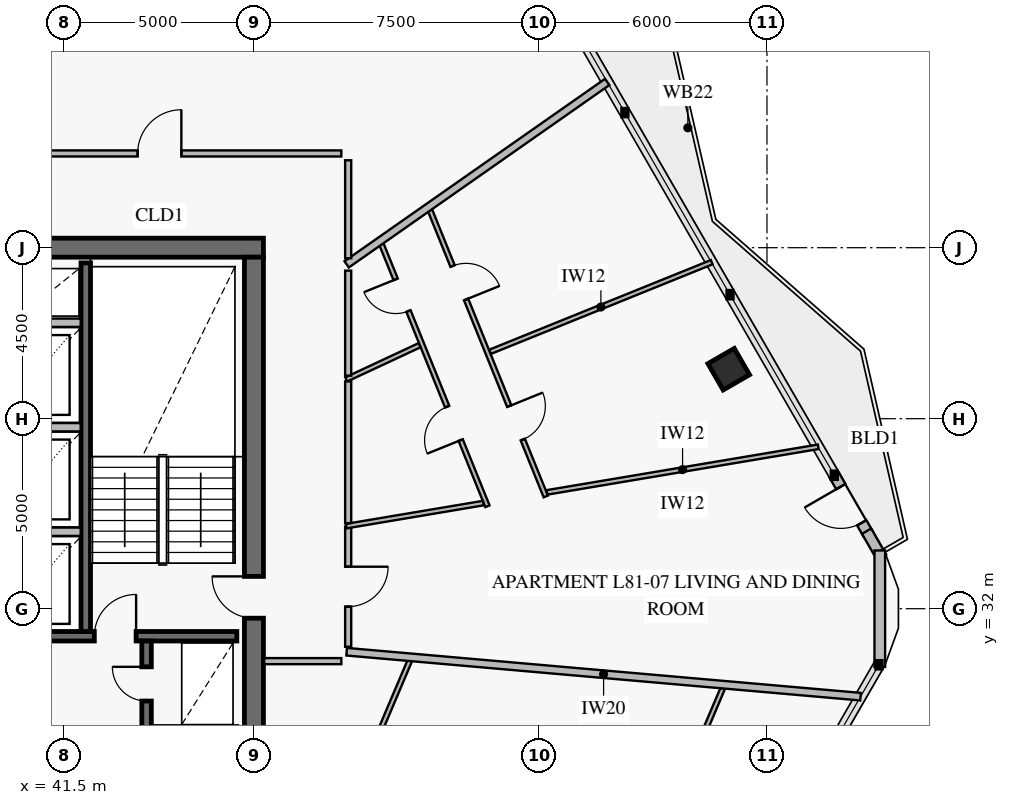
"""IFC4 building model, lengths in metres.
Left out: names, types, materials, properties, quantities, classifications, styles, units other than length and angle.
Written with IfcOpenShell. Run it as: python <this file> out.ifc"""

import sys

from ifc_helpers import new_model, si_unit, direction, frame, frame_2d, origin, origin_2d, place, context, subcontext, project, spatial, rectangle, extrude, element, fill, save


model = new_model("IFC4")
c1 = context("Model", 3, precision=1e-05, world=origin(), true_north=direction((0.0, 1.0)))
c2 = subcontext(c1, "Body", "Model", "MODEL_VIEW")
j1 = project(units=[si_unit("LENGTHUNIT", "METRE"), si_unit("PLANEANGLEUNIT", "RADIAN")], contexts=[c1])
p1 = place(None, origin())
s1 = spatial("IfcSite", under=j1, at=p1, CompositionType="ELEMENT")
p2 = place(p1, origin())
s2 = spatial("IfcBuilding", under=s1, at=p2, CompositionType="ELEMENT")
p3 = place(p2, frame((0.0, 0.0, 319.6)))
s3 = spatial("IfcBuildingStorey", under=s2, at=p3, CompositionType="ELEMENT", Elevation=319.6)
p4 = place(p3, frame((46.75, 41.5, 0.0), z_axis=(0.0, 0.0, 1.0), x_axis=(-1.0, 0.0, 0.0)))
e1 = element("IfcWall", 1, at=p4, inside=s3, PredefinedType="SHEAR", context=c2, shape_type="SweptSolid", body=[
    extrude(rectangle(XDim=7.8, YDim=0.5, at=frame_2d((3.9, 0.0))), origin(), (0.0, 0.0, 1.0), 3.8),
])
p5 = place(p3, frame((46.5, 22.75, 0.0), z_axis=(0.0, 0.0, 1.0), x_axis=(0.0, 1.0, 0.0)))
e2 = element("IfcWall", 2, at=p5, inside=s3, PredefinedType="SHEAR", context=c2, shape_type="SweptSolid", body=[
    extrude(rectangle(XDim=18.5, YDim=0.5, at=frame_2d((9.25, 0.0))), origin(), (0.0, 0.0, 1.0), 3.8),
])
p6 = place(p5, frame((9.0, 0.0, 0.0)))
e3 = element("IfcOpeningElement", 3, at=p6, cuts=e2, PredefinedType="OPENING", context=c2, shape_type="SweptSolid", body=[
    extrude(rectangle(XDim=1.1, YDim=2.15, at=frame_2d((0.55, 1.075))), frame((0.0, 0.262, 0.0), z_axis=(0.0, -1.0, 0.0), x_axis=(1.0, 0.0, 0.0)), (0.0, 0.0, 1.0), 0.524),
])
p7 = place(p3, frame((58.993, 38.302, 0.0), z_axis=(0.0, 0.0, 1.0), x_axis=(-0.5, 0.866025403784, 0.0)))
e4 = element("IfcColumn", 4, at=p7, inside=s3, PredefinedType="COLUMN", context=c2, shape_type="SweptSolid", body=[
    extrude(rectangle(XDim=0.8, YDim=0.8, at=origin_2d()), origin(), (0.0, 0.0, 1.0), 3.55),
])
p8 = place(p3, frame((61.771, 35.512, 0.0), z_axis=(0.0, 0.0, 1.0), x_axis=(0.499982180423, -0.866035691677, 0.0)))
e5 = element("IfcWall", 5, at=p8, inside=s3, PredefinedType="SOLIDWALL", context=c2, shape_type="SweptSolid", body=[
    extrude(rectangle(XDim=1.79, YDim=0.28, at=frame_2d((0.895, 0.0))), origin(), (0.0, 0.0, 1.0), 3.55),
])
p9 = place(p8, frame((0.345, 0.0, 0.0)))
e6 = element("IfcOpeningElement", 6, at=p9, cuts=e5, PredefinedType="OPENING", context=c2, shape_type="SweptSolid", body=[
    extrude(rectangle(XDim=1.1, YDim=2.2, at=frame_2d((0.55, 1.1))), frame((0.0, 0.152, 0.0), z_axis=(0.0, -1.0, 0.0), x_axis=(1.0, 0.0, 0.0)), (0.0, 0.0, 1.0), 0.304),
])
p10 = place(p3, frame((62.621, 34.039, 0.0), z_axis=(0.0, 0.0, 1.0), x_axis=(0.500061319399, -0.865989998118, 0.0)))
e7 = element("IfcWall", 7, at=p10, inside=s3, PredefinedType="SOLIDWALL", context=c2, shape_type="SweptSolid", body=[
    extrude(rectangle(XDim=0.79, YDim=0.28, at=frame_2d((0.395, 0.0))), origin(), (0.0, 0.0, 1.0), 3.122),
])
p11 = place(p3, frame((62.969, 33.532, 0.0), z_axis=(0.0, 0.0, 1.0), x_axis=(0.0, -1.0, 0.0)))
e8 = element("IfcWall", 8, at=p11, inside=s3, PredefinedType="SOLIDWALL", context=c2, shape_type="SweptSolid", body=[
    extrude(rectangle(XDim=3.065, YDim=0.28, at=frame_2d((1.532, 0.0))), origin(), (0.0, 0.0, 1.0), 3.55),
])
p12 = place(p3, frame((25.95, 31.275, 0.0), z_axis=(0.0, 0.0, 1.0), x_axis=(1.0, 0.0, 0.0)))
e9 = element("IfcWall", 9, at=p12, inside=s3, PredefinedType="SOLIDWALL", context=c2, shape_type="SweptSolid", body=[
    extrude(rectangle(XDim=20.1, YDim=0.25, at=frame_2d((10.05, 0.0))), origin(), (0.0, 0.0, 1.0), 3.8),
])
p13 = place(p12, frame((2.6, 0.0, 0.0)))
e10 = element("IfcOpeningElement", 10, at=p13, cuts=e9, PredefinedType="OPENING", context=c2, shape_type="SweptSolid", body=[
    extrude(rectangle(XDim=1.1, YDim=2.15, at=frame_2d((0.55, 1.075))), frame((0.0, 0.137, 0.0), z_axis=(0.0, -1.0, 0.0), x_axis=(1.0, 0.0, 0.0)), (0.0, 0.0, 1.0), 0.274),
])
p14 = place(p12, frame((10.6, 0.0, 0.0)))
e11 = element("IfcOpeningElement", 11, at=p14, cuts=e9, PredefinedType="OPENING", context=c2, shape_type="SweptSolid", body=[
    extrude(rectangle(XDim=1.1, YDim=2.15, at=frame_2d((0.55, 1.075))), frame((0.0, 0.137, 0.0), z_axis=(0.0, -1.0, 0.0), x_axis=(1.0, 0.0, 0.0)), (0.0, 0.0, 1.0), 0.274),
])
p15 = place(p12, frame((16.35, 0.0, 0.0)))
e12 = element("IfcOpeningElement", 12, at=p15, cuts=e9, PredefinedType="OPENING", context=c2, shape_type="SweptSolid", body=[
    extrude(rectangle(XDim=1.1, YDim=2.15, at=frame_2d((0.55, 1.075))), frame((0.0, 0.137, 0.0), z_axis=(0.0, -1.0, 0.0), x_axis=(1.0, 0.0, 0.0)), (0.0, 0.0, 1.0), 0.274),
])
p16 = place(p3, frame((42.075, 31.4, 0.0), z_axis=(0.0, 0.0, 1.0), x_axis=(0.0, 1.0, 0.0)))
e13 = element("IfcWall", 13, at=p16, inside=s3, PredefinedType="SOLIDWALL", context=c2, shape_type="SweptSolid", body=[
    extrude(rectangle(XDim=9.7, YDim=0.25, at=frame_2d((4.85, 0.0))), origin(), (0.0, 0.0, 1.0), 3.8),
])
p17 = place(p3, frame((43.675, 22.95, 0.0), z_axis=(0.0, 0.0, 1.0), x_axis=(0.0, 1.0, 0.0)))
e14 = element("IfcWall", 14, at=p17, inside=s3, PredefinedType="SOLIDWALL", context=c2, shape_type="SweptSolid", body=[
    extrude(rectangle(XDim=8.2, YDim=0.25, at=frame_2d((4.1, 0.0))), origin(), (0.0, 0.0, 1.0), 3.8),
])
p18 = place(p17, frame((0.75, 0.0, 0.0)))
e15 = element("IfcOpeningElement", 15, at=p18, cuts=e14, PredefinedType="OPENING", context=c2, shape_type="SweptSolid", body=[
    extrude(rectangle(XDim=1.3, YDim=2.3, at=frame_2d((0.65, 1.15))), frame((0.0, 0.137, 0.0), z_axis=(0.0, -1.0, 0.0), x_axis=(1.0, 0.0, 0.0)), (0.0, 0.0, 1.0), 0.274),
])
p19 = place(p17, frame((3.7, 0.0, 0.0)))
e16 = element("IfcOpeningElement", 16, at=p19, cuts=e14, PredefinedType="OPENING", context=c2, shape_type="SweptSolid", body=[
    extrude(rectangle(XDim=1.3, YDim=2.3, at=frame_2d((0.65, 1.15))), frame((0.0, 0.137, 0.0), z_axis=(0.0, -1.0, 0.0), x_axis=(1.0, 0.0, 0.0)), (0.0, 0.0, 1.0), 0.274),
])
p20 = place(p17, frame((6.62, 0.0, 0.0)))
e17 = element("IfcOpeningElement", 17, at=p20, cuts=e14, PredefinedType="OPENING", context=c2, shape_type="SweptSolid", body=[
    extrude(rectangle(XDim=0.9, YDim=2.1, at=frame_2d((0.45, 1.05))), frame((0.0, 0.137, 0.0), z_axis=(0.0, -1.0, 0.0), x_axis=(1.0, 0.0, 0.0)), (0.0, 0.0, 1.0), 0.274),
])
p21 = place(p3, frame((55.504, 22.053, 0.0), z_axis=(0.0, 0.0, 1.0), x_axis=(0.390730730801, 0.920505022261, 0.0)))
e18 = element("IfcWall", 18, at=p21, inside=s3, PredefinedType="PARTITIONING", context=c2, shape_type="SweptSolid", body=[
    extrude(rectangle(XDim=8.526, YDim=0.12, at=frame_2d((4.263, 0.0))), origin(), (0.0, 0.0, 1.0), 3.0),
])
p22 = place(p21, frame((3.704, 0.0, 0.0)))
e19 = element("IfcOpeningElement", 19, at=p22, cuts=e18, PredefinedType="OPENING", context=c2, shape_type="SweptSolid", body=[
    extrude(rectangle(XDim=0.95, YDim=2.1, at=frame_2d((0.475, 1.05))), frame((0.0, 0.072, 0.0), z_axis=(0.0, -1.0, 0.0), x_axis=(1.0, 0.0, 0.0)), (0.0, 0.0, 1.0), 0.144),
])
p23 = place(p3, frame((52.644, 34.696, 0.0), z_axis=(0.0, 0.0, 1.0), x_axis=(-0.374926411414, 0.927054575537, 0.0)))
e20 = element("IfcWall", 20, at=p23, inside=s3, PredefinedType="PARTITIONING", context=c2, shape_type="SweptSolid", body=[
    extrude(rectangle(XDim=7.483, YDim=0.12, at=frame_2d((3.741, 0.0))), origin(), (0.0, 0.0, 1.0), 3.0),
])
p24 = place(p23, frame((1.877, 0.0, 0.0)))
e21 = element("IfcOpeningElement", 21, at=p24, cuts=e20, PredefinedType="OPENING", context=c2, shape_type="SweptSolid", body=[
    extrude(rectangle(XDim=0.95, YDim=2.1, at=frame_2d((0.475, 1.05))), frame((0.0, 0.072, 0.0), z_axis=(0.0, -1.0, 0.0), x_axis=(1.0, 0.0, 0.0)), (0.0, 0.0, 1.0), 0.144),
])
p25 = place(p23, frame((5.541, 0.0, 0.0)))
e22 = element("IfcOpeningElement", 22, at=p25, cuts=e20, PredefinedType="OPENING", context=c2, shape_type="SweptSolid", body=[
    extrude(rectangle(XDim=0.9, YDim=2.1, at=frame_2d((0.45, 1.05))), frame((0.0, 0.072, 0.0), z_axis=(0.0, -1.0, 0.0), x_axis=(1.0, 0.0, 0.0)), (0.0, 0.0, 1.0), 0.144),
])
p26 = place(p3, frame((54.179, 34.954, 0.0), z_axis=(0.0, 0.0, 1.0), x_axis=(-0.374928779354, 0.927053617873, 0.0)))
e23 = element("IfcWall", 23, at=p26, inside=s3, PredefinedType="PARTITIONING", context=c2, shape_type="SweptSolid", body=[
    extrude(rectangle(XDim=8.155, YDim=0.12, at=frame_2d((4.078, 0.0))), origin(), (0.0, 0.0, 1.0), 3.0),
])
p27 = place(p26, frame((1.614, 0.0, 0.0)))
e24 = element("IfcOpeningElement", 24, at=p27, cuts=e23, PredefinedType="OPENING", context=c2, shape_type="SweptSolid", body=[
    extrude(rectangle(XDim=0.95, YDim=2.1, at=frame_2d((0.475, 1.05))), frame((0.0, 0.072, 0.0), z_axis=(0.0, -1.0, 0.0), x_axis=(1.0, 0.0, 0.0)), (0.0, 0.0, 1.0), 0.144),
])
p28 = place(p26, frame((5.592, 0.0, 0.0)))
e25 = element("IfcOpeningElement", 25, at=p28, cuts=e23, PredefinedType="OPENING", context=c2, shape_type="SweptSolid", body=[
    extrude(rectangle(XDim=0.95, YDim=2.1, at=frame_2d((0.475, 1.05))), frame((0.0, 0.072, 0.0), z_axis=(0.0, -1.0, 0.0), x_axis=(1.0, 0.0, 0.0)), (0.0, 0.0, 1.0), 0.144),
])
p29 = place(p3, frame((48.98, 30.999, 0.0), z_axis=(0.0, 0.0, 1.0), x_axis=(0.0, 1.0, 0.0)))
e26 = element("IfcWall", 26, at=p29, inside=s3, PredefinedType="PARTITIONING", context=c2, shape_type="SweptSolid", body=[
    extrude(rectangle(XDim=3.163, YDim=0.16, at=frame_2d((1.581, 0.0))), origin(), (0.0, 0.0, 1.0), 3.55),
])
p30 = place(p29, frame((1.056, 0.0, 0.0)))
e27 = element("IfcOpeningElement", 27, at=p30, cuts=e26, PredefinedType="OPENING", context=c2, shape_type="SweptSolid", body=[
    extrude(rectangle(XDim=1.05, YDim=2.15, at=frame_2d((0.525, 1.075))), frame((0.0, 0.092, 0.0), z_axis=(0.0, -1.0, 0.0), x_axis=(1.0, 0.0, 0.0)), (0.0, 0.0, 1.0), 0.184),
])
p31 = place(p3, frame((48.8, 43.98, 0.0), z_axis=(0.0, 0.0, 1.0), x_axis=(-1.0, 0.0, 0.0)))
e28 = element("IfcWall", 28, at=p31, inside=s3, PredefinedType="PARTITIONING", context=c2, shape_type="SweptSolid", body=[
    extrude(rectangle(XDim=9.569, YDim=0.16, at=frame_2d((4.785, 0.0))), origin(), (0.0, 0.0, 1.0), 3.0),
])
p32 = place(p31, frame((4.21, 0.0, 0.0)))
e29 = element("IfcOpeningElement", 29, at=p32, cuts=e28, PredefinedType="OPENING", context=c2, shape_type="SweptSolid", body=[
    extrude(rectangle(XDim=1.15, YDim=2.2, at=frame_2d((0.575, 1.1))), frame((0.0, 0.092, 0.0), z_axis=(0.0, -1.0, 0.0), x_axis=(1.0, 0.0, 0.0)), (0.0, 0.0, 1.0), 0.184),
])
for number, where, z_axis, x_axis in (
    (30, (39.558, 34.025, 0.0), (0.0, 0.0, 1.0), (1.0, 0.0, 0.0)),
    (31, (39.558, 36.775, 0.0), (0.0, 0.0, 1.0), (1.0, 0.0, 0.0)),
    (32, (39.558, 39.525, 0.0), (0.0, 0.0, 1.0), (1.0, 0.0, 0.0)),
):
    element("IfcWall", number, at=place(p3, frame(where, z_axis=z_axis, x_axis=x_axis)), inside=s3, PredefinedType="PARTITIONING", context=c2, shape_type="SweptSolid", body=[
        extrude(rectangle(XDim=2.384, YDim=0.22, at=frame_2d((1.192, 0.0))), origin(), (0.0, 0.0, 1.0), 3.55),
    ])
p33 = place(p3, frame((48.49, 25.658, 0.0), z_axis=(0.0, 0.0, 1.0), x_axis=(0.390765351484, 0.920490325902, 0.0)))
e33 = element("IfcWall", 33, at=p33, inside=s3, PredefinedType="PARTITIONING", context=c2, shape_type="SweptSolid", body=[
    extrude(rectangle(XDim=5.469, YDim=0.12, at=frame_2d((2.735, 0.0))), origin(), (0.0, 0.0, 1.0), 3.0),
])
p34 = place(p3, frame((48.94, 30.868, 0.0), z_axis=(0.0, 0.0, 1.0), x_axis=(0.996194010343, -0.087163603397, 0.0)))
e34 = element("IfcWall", 34, at=p34, inside=s3, PredefinedType="PARTITIONING", context=c2, shape_type="SweptSolid", body=[
    extrude(rectangle(XDim=13.573, YDim=0.2, at=frame_2d((6.787, 0.0))), origin(), (0.0, 0.0, 1.0), 2.97),
])
p35 = place(p3, frame((48.93, 38.033, 0.0), z_axis=(0.0, 0.0, 1.0), x_axis=(0.906197801286, 0.422854046857, 0.0)))
e35 = element("IfcWall", 35, at=p35, inside=s3, PredefinedType="PARTITIONING", context=c2, shape_type="SweptSolid", body=[
    extrude(rectangle(XDim=2.127, YDim=0.12, at=frame_2d((1.063, 0.0))), origin(), (0.0, 0.0, 1.0), 3.55),
])
p36 = place(p3, frame((52.714, 38.76, 0.0), z_axis=(0.0, 0.0, 1.0), x_axis=(0.927048652302, 0.374941057056, 0.0)))
e36 = element("IfcWall", 36, at=p36, inside=s3, PredefinedType="PARTITIONING", context=c2, shape_type="SweptSolid", body=[
    extrude(rectangle(XDim=6.291, YDim=0.12, at=frame_2d((3.146, 0.0))), origin(), (0.0, 0.0, 1.0), 2.97),
])
p37 = place(p3, frame((48.93, 34.173, 0.0), z_axis=(0.0, 0.0, 1.0), x_axis=(0.986167473013, 0.165751968828, 0.0)))
e37 = element("IfcWall", 37, at=p37, inside=s3, PredefinedType="PARTITIONING", context=c2, shape_type="SweptSolid", body=[
    extrude(rectangle(XDim=3.657, YDim=0.12, at=frame_2d((1.829, 0.0))), origin(), (0.0, 0.0, 1.0), 3.55),
])
p38 = place(p3, frame((54.21, 35.06, 0.0), z_axis=(0.0, 0.0, 1.0), x_axis=(0.986169680344, 0.165738835432, 0.0)))
e38 = element("IfcWall", 38, at=p38, inside=s3, PredefinedType="PARTITIONING", context=c2, shape_type="SweptSolid", body=[
    extrude(rectangle(XDim=7.239, YDim=0.12, at=frame_2d((3.619, 0.0))), origin(), (0.0, 0.0, 1.0), 2.97),
])
p39 = place(p3, frame((48.94, 41.061, 0.0), z_axis=(0.0, 0.0, 1.0), x_axis=(0.819159279368, 0.573566103448, 0.0)))
e39 = element("IfcWall", 39, at=p39, inside=s3, PredefinedType="PARTITIONING", context=c2, shape_type="SweptSolid", body=[
    extrude(rectangle(XDim=8.369, YDim=0.2, at=frame_2d((4.185, 0.0))), origin(), (0.0, 0.0, 1.0), 2.97),
])
p40 = place(p3, frame((39.234, 44.068, 0.0), z_axis=(0.0, 0.0, 1.0), x_axis=(0.258812989646, 0.965927448823, 0.0)))
e40 = element("IfcWall", 40, at=p40, inside=s3, PredefinedType="PARTITIONING", context=c2, shape_type="SweptSolid", body=[
    extrude(rectangle(XDim=10.949, YDim=0.2, at=frame_2d((5.475, 0.0))), origin(), (0.0, 0.0, 1.0), 3.0),
])
p41 = place(p3, frame((46.77, 30.62, 0.0), z_axis=(0.0, 0.0, 1.0), x_axis=(1.0, 0.0, 0.0)))
e41 = element("IfcWall", 41, at=p41, inside=s3, PredefinedType="PARTITIONING", context=c2, shape_type="SweptSolid", body=[
    extrude(rectangle(XDim=2.03, YDim=0.16, at=frame_2d((1.015, 0.0))), origin(), (0.0, 0.0, 1.0), 3.55),
])
p42 = place(p3, frame((48.98, 34.25, 0.0), z_axis=(0.0, 0.0, 1.0), x_axis=(0.0, 1.0, 0.0)))
e42 = element("IfcWall", 42, at=p42, inside=s3, PredefinedType="PARTITIONING", context=c2, shape_type="SweptSolid", body=[
    extrude(rectangle(XDim=3.731, YDim=0.16, at=frame_2d((1.866, 0.0))), origin(), (0.0, 0.0, 1.0), 3.0),
])
p43 = place(p3, frame((48.98, 38.132, 0.0), z_axis=(0.0, 0.0, 1.0), x_axis=(0.0, 1.0, 0.0)))
e43 = element("IfcWall", 43, at=p43, inside=s3, PredefinedType="PARTITIONING", context=c2, shape_type="SweptSolid", body=[
    extrude(rectangle(XDim=2.765, YDim=0.16, at=frame_2d((1.382, 0.0))), origin(), (0.0, 0.0, 1.0), 3.55),
])
p44 = place(p3, frame((48.98, 41.221, 0.0), z_axis=(0.0, 0.0, 1.0), x_axis=(0.0, 1.0, 0.0)))
e44 = element("IfcWall", 44, at=p44, inside=s3, PredefinedType="PARTITIONING", context=c2, shape_type="SweptSolid", body=[
    extrude(rectangle(XDim=2.579, YDim=0.16, at=frame_2d((1.29, 0.0))), origin(), (0.0, 0.0, 1.0), 3.55),
])
p45 = place(p9, frame((1.1, 0.0, 0.0), z_axis=(0.0, 0.0, 1.0), x_axis=(-1.0, 0.0, 0.0)))
e45 = element("IfcDoor", 45, at=p45, inside=s3, OperationType="SINGLE_SWING_RIGHT", PredefinedType="DOOR", context=c2, shape_type="SweptSolid", body=[
    extrude(rectangle(XDim=1.1, YDim=2.2, at=frame_2d((0.55, 1.1))), frame((0.0, 0.025, 0.0), z_axis=(0.0, -1.0, 0.0), x_axis=(1.0, 0.0, 0.0)), (0.0, 0.0, 1.0), 0.05),
])
fill(e6, e45)
p46 = place(p6, origin())
e46 = element("IfcDoor", 46, at=p46, inside=s3, OperationType="SINGLE_SWING_RIGHT", PredefinedType="USERDEFINED", context=c2, shape_type="SweptSolid", body=[
    extrude(rectangle(XDim=1.1, YDim=2.15, at=frame_2d((0.55, 1.075))), frame((0.0, 0.025, 0.0), z_axis=(0.0, -1.0, 0.0), x_axis=(1.0, 0.0, 0.0)), (0.0, 0.0, 1.0), 0.05),
])
fill(e3, e46)
p47 = place(p15, origin())
e47 = element("IfcDoor", 47, at=p47, inside=s3, OperationType="SINGLE_SWING_RIGHT", PredefinedType="USERDEFINED", context=c2, shape_type="SweptSolid", body=[
    extrude(rectangle(XDim=1.1, YDim=2.15, at=frame_2d((0.55, 1.075))), frame((0.0, 0.025, 0.0), z_axis=(0.0, -1.0, 0.0), x_axis=(1.0, 0.0, 0.0)), (0.0, 0.0, 1.0), 0.05),
])
fill(e12, e47)
p48 = place(p20, origin())
e48 = element("IfcDoor", 48, at=p48, inside=s3, OperationType="SINGLE_SWING_RIGHT", PredefinedType="DOOR", context=c2, shape_type="SweptSolid", body=[
    extrude(rectangle(XDim=0.9, YDim=2.1, at=frame_2d((0.45, 1.05))), frame((0.0, 0.025, 0.0), z_axis=(0.0, -1.0, 0.0), x_axis=(1.0, 0.0, 0.0)), (0.0, 0.0, 1.0), 0.05),
])
fill(e17, e48)
p49 = place(p24, origin())
e49 = element("IfcDoor", 49, at=p49, inside=s3, OperationType="SINGLE_SWING_LEFT", PredefinedType="DOOR", context=c2, shape_type="SweptSolid", body=[
    extrude(rectangle(XDim=0.95, YDim=2.1, at=frame_2d((0.475, 1.05))), frame((0.0, 0.025, 0.0), z_axis=(0.0, -1.0, 0.0), x_axis=(1.0, 0.0, 0.0)), (0.0, 0.0, 1.0), 0.05),
])
fill(e21, e49)
p50 = place(p25, origin())
e50 = element("IfcDoor", 50, at=p50, inside=s3, OperationType="SINGLE_SWING_RIGHT", PredefinedType="DOOR", context=c2, shape_type="SweptSolid", body=[
    extrude(rectangle(XDim=0.9, YDim=2.1, at=frame_2d((0.45, 1.05))), frame((0.0, 0.025, 0.0), z_axis=(0.0, -1.0, 0.0), x_axis=(1.0, 0.0, 0.0)), (0.0, 0.0, 1.0), 0.05),
])
fill(e22, e50)
p51 = place(p27, frame((0.95, 0.0, 0.0), z_axis=(0.0, 0.0, 1.0), x_axis=(-1.0, 0.0, 0.0)))
e51 = element("IfcDoor", 51, at=p51, inside=s3, OperationType="SINGLE_SWING_LEFT", PredefinedType="DOOR", context=c2, shape_type="SweptSolid", body=[
    extrude(rectangle(XDim=0.95, YDim=2.1, at=frame_2d((0.475, 1.05))), frame((0.0, 0.025, 0.0), z_axis=(0.0, -1.0, 0.0), x_axis=(1.0, 0.0, 0.0)), (0.0, 0.0, 1.0), 0.05),
])
fill(e24, e51)
p52 = place(p28, frame((0.95, 0.0, 0.0), z_axis=(0.0, 0.0, 1.0), x_axis=(-1.0, 0.0, 0.0)))
e52 = element("IfcDoor", 52, at=p52, inside=s3, OperationType="SINGLE_SWING_RIGHT", PredefinedType="DOOR", context=c2, shape_type="SweptSolid", body=[
    extrude(rectangle(XDim=0.95, YDim=2.1, at=frame_2d((0.475, 1.05))), frame((0.0, 0.025, 0.0), z_axis=(0.0, -1.0, 0.0), x_axis=(1.0, 0.0, 0.0)), (0.0, 0.0, 1.0), 0.05),
])
fill(e25, e52)
p53 = place(p30, frame((1.05, 0.0, 0.0), z_axis=(0.0, 0.0, 1.0), x_axis=(-1.0, 0.0, 0.0)))
e53 = element("IfcDoor", 53, at=p53, inside=s3, OperationType="SINGLE_SWING_LEFT", PredefinedType="DOOR", context=c2, shape_type="SweptSolid", body=[
    extrude(rectangle(XDim=1.05, YDim=2.15, at=frame_2d((0.525, 1.075))), frame((0.0, 0.025, 0.0), z_axis=(0.0, -1.0, 0.0), x_axis=(1.0, 0.0, 0.0)), (0.0, 0.0, 1.0), 0.05),
])
fill(e27, e53)
p54 = place(p32, frame((1.15, 0.0, 0.0), z_axis=(0.0, 0.0, 1.0), x_axis=(-1.0, 0.0, 0.0)))
e54 = element("IfcDoor", 54, at=p54, inside=s3, OperationType="SINGLE_SWING_RIGHT", PredefinedType="DOOR", context=c2, shape_type="SweptSolid", body=[
    extrude(rectangle(XDim=1.15, YDim=2.2, at=frame_2d((0.575, 1.1))), frame((0.0, 0.025, 0.0), z_axis=(0.0, -1.0, 0.0), x_axis=(1.0, 0.0, 0.0)), (0.0, 0.0, 1.0), 0.05),
])
fill(e29, e54)
save(model, sys.argv[1])
